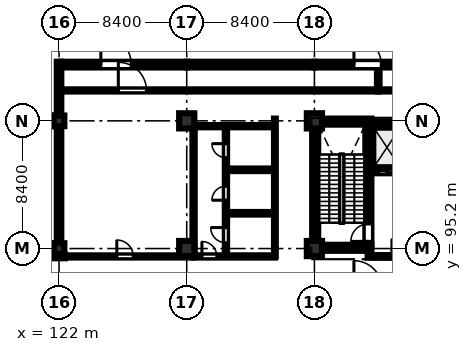
"""IFC4 building model, lengths in metres.
Left out: names, types, materials, properties, quantities, classifications, styles, units other than length and angle.
Written with IfcOpenShell. Run it as: python <this file> out.ifc"""

import sys

from ifc_helpers import new_model, si_unit, direction, frame, frame_2d, origin, origin_2d, place, context, subcontext, project, spatial, rectangle, extrude, element, fill, save


model = new_model("IFC4")
c1 = context("Model", 3, precision=1e-05, world=origin(), true_north=direction((0.0, 1.0)))
c2 = subcontext(c1, "Body", "Model", "MODEL_VIEW")
j1 = project(units=[si_unit("LENGTHUNIT", "METRE"), si_unit("PLANEANGLEUNIT", "RADIAN")], contexts=[c1])
p1 = place(None, origin())
s1 = spatial("IfcSite", under=j1, at=p1, CompositionType="ELEMENT")
p2 = place(p1, origin())
s2 = spatial("IfcBuilding", under=s1, at=p2, CompositionType="ELEMENT")
p3 = place(p2, origin())
s3 = spatial("IfcBuildingStorey", under=s2, at=p3, CompositionType="ELEMENT", Elevation=0.0)
for number, where, z_axis, x_axis in (
    (1, (122.0, 95.2, 0.0), (0.0, 0.0, 1.0), (1.0, 0.0, 0.0)),
    (2, (122.0, 103.6, 0.0), (0.0, 0.0, 1.0), (1.0, 0.0, 0.0)),
):
    element("IfcColumn", number, at=place(p3, frame(where, z_axis=z_axis, x_axis=x_axis)), inside=s3, PredefinedType="COLUMN", context=c2, shape_type="SweptSolid", body=[
        extrude(rectangle(XDim=0.7, YDim=0.7, at=origin_2d()), origin(), (0.0, 0.0, 1.0), 5.18),
    ])
for number, where, z_axis, x_axis in (
    (3, (130.4, 95.2, 0.0), (0.0, 0.0, 1.0), (1.0, 0.0, 0.0)),
    (4, (130.4, 103.6, 0.0), (0.0, 0.0, 1.0), (1.0, 0.0, 0.0)),
    (5, (138.8, 95.2, 0.0), (0.0, 0.0, 1.0), (1.0, 0.0, 0.0)),
    (6, (138.8, 103.6, 0.0), (0.0, 0.0, 1.0), (1.0, 0.0, 0.0)),
):
    element("IfcColumn", number, at=place(p3, frame(where, z_axis=z_axis, x_axis=x_axis)), inside=s3, PredefinedType="COLUMN", context=c2, shape_type="SweptSolid", body=[
        extrude(rectangle(XDim=1.0, YDim=1.0, at=origin_2d()), origin(), (0.0, 0.0, 1.0), 5.18),
    ])
for number, where, z_axis, x_axis in (
    (7, (138.65, 95.25, 0.0), (0.0, 0.0, 1.0), (1.0, 0.0, 0.0)),
    (8, (138.65, 103.55, 0.0), (0.0, 0.0, 1.0), (1.0, 0.0, 0.0)),
):
    element("IfcWall", number, at=place(p3, frame(where, z_axis=z_axis, x_axis=x_axis)), inside=s3, PredefinedType="SHEAR", context=c2, shape_type="SweptSolid", body=[
        extrude(rectangle(XDim=3.9, YDim=0.4, at=frame_2d((1.95, 0.0))), origin(), (0.0, 0.0, 1.0), 5.18),
    ])
p4 = place(p3, frame((138.85, 95.45, 0.0), z_axis=(0.0, 0.0, 1.0), x_axis=(0.0, 1.0, 0.0)))
e9 = element("IfcWall", 9, at=p4, inside=s3, PredefinedType="SHEAR", context=c2, shape_type="SweptSolid", body=[
    extrude(rectangle(XDim=7.9, YDim=0.4, at=frame_2d((3.95, 0.0))), origin(), (0.0, 0.0, 1.0), 5.18),
])
p5 = place(p3, frame((142.35, 95.45, 0.0), z_axis=(0.0, 0.0, 1.0), x_axis=(0.0, 1.0, 0.0)))
e10 = element("IfcWall", 10, at=p5, inside=s3, PredefinedType="SHEAR", context=c2, shape_type="SweptSolid", body=[
    extrude(rectangle(XDim=7.9, YDim=0.4, at=frame_2d((3.95, 0.0))), origin(), (0.0, 0.0, 1.0), 5.18),
])
p6 = place(p5, frame((0.22, 0.0, 0.0)))
e11 = element("IfcOpeningElement", 11, at=p6, cuts=e10, PredefinedType="OPENING", context=c2, shape_type="SweptSolid", body=[
    extrude(rectangle(XDim=1.15, YDim=2.15, at=frame_2d((0.575, 1.075))), frame((0.0, 0.21, 0.0), z_axis=(0.0, -1.0, 0.0), x_axis=(1.0, 0.0, 0.0)), (0.0, 0.0, 1.0), 0.42),
])
p7 = place(p3, frame((142.55, 100.275, 0.0), z_axis=(0.0, 0.0, 1.0), x_axis=(1.0, 0.0, 0.0)))
e12 = element("IfcWall", 12, at=p7, inside=s3, PredefinedType="SHEAR", context=c2, shape_type="SweptSolid", body=[
    extrude(rectangle(XDim=2.05, YDim=0.25, at=frame_2d((1.025, 0.0))), origin(), (0.0, 0.0, 1.0), 5.18),
])
p8 = place(p7, frame((0.475, 0.0, 0.0)))
e13 = element("IfcOpeningElement", 13, at=p8, cuts=e12, PredefinedType="OPENING", context=c2, shape_type="SweptSolid", body=[
    extrude(rectangle(XDim=1.1, YDim=2.15, at=frame_2d((0.55, 1.075))), frame((0.0, 0.135, 0.0), z_axis=(0.0, -1.0, 0.0), x_axis=(1.0, 0.0, 0.0)), (0.0, 0.0, 1.0), 0.27),
])
p9 = place(p3, frame((142.55, 103.425, 0.0), z_axis=(0.0, 0.0, 1.0), x_axis=(1.0, 0.0, 0.0)))
e14 = element("IfcWall", 14, at=p9, inside=s3, PredefinedType="SHEAR", context=c2, shape_type="SweptSolid", body=[
    extrude(rectangle(XDim=2.05, YDim=0.25, at=frame_2d((1.025, 0.0))), origin(), (0.0, 0.0, 1.0), 5.18),
])
p10 = place(p3, frame((122.15, 107.3, 0.0), z_axis=(0.0, 0.0, 1.0), x_axis=(1.0, 0.0, 0.0)))
e15 = element("IfcWall", 15, at=p10, inside=s3, PredefinedType="SOLIDWALL", context=c2, shape_type="SweptSolid", body=[
    extrude(rectangle(XDim=8.25, YDim=0.38, at=frame_2d((4.125, 0.0))), origin(), (0.0, 0.0, 1.0), 5.18),
])
p11 = place(p10, frame((2.6, 0.0, 0.0)))
e16 = element("IfcOpeningElement", 16, at=p11, cuts=e15, PredefinedType="OPENING", context=c2, shape_type="SweptSolid", body=[
    extrude(rectangle(XDim=2.0, YDim=2.4, at=frame_2d((1.0, 1.2))), frame((0.0, 0.2, 0.0), z_axis=(0.0, -1.0, 0.0), x_axis=(1.0, 0.0, 0.0)), (0.0, 0.0, 1.0), 0.4),
])
p12 = place(p3, frame((130.4, 107.3, 0.0), z_axis=(0.0, 0.0, 1.0), x_axis=(1.0, 0.0, 0.0)))
e17 = element("IfcWall", 17, at=p12, inside=s3, PredefinedType="SOLIDWALL", context=c2, shape_type="SweptSolid", body=[
    extrude(rectangle(XDim=8.4, YDim=0.38, at=frame_2d((4.2, 0.0))), origin(), (0.0, 0.0, 1.0), 5.18),
])
p13 = place(p12, frame((2.4, 0.0, 0.85)))
e18 = element("IfcOpeningElement", 18, at=p13, cuts=e17, PredefinedType="OPENING", context=c2, shape_type="SweptSolid", body=[
    extrude(rectangle(XDim=2.6, YDim=2.4, at=frame_2d((1.3, 1.2))), frame((0.0, 0.2, 0.0), z_axis=(0.0, -1.0, 0.0), x_axis=(1.0, 0.0, 0.0)), (0.0, 0.0, 1.0), 0.4),
])
p14 = place(p3, frame((138.8, 107.3, 0.0), z_axis=(0.0, 0.0, 1.0), x_axis=(1.0, 0.0, 0.0)))
e19 = element("IfcWall", 19, at=p14, inside=s3, PredefinedType="SOLIDWALL", context=c2, shape_type="SweptSolid", body=[
    extrude(rectangle(XDim=8.4, YDim=0.38, at=frame_2d((4.2, 0.0))), origin(), (0.0, 0.0, 1.0), 5.18),
])
p15 = place(p14, frame((2.6, 0.0, 0.0)))
e20 = element("IfcOpeningElement", 20, at=p15, cuts=e19, PredefinedType="OPENING", context=c2, shape_type="SweptSolid", body=[
    extrude(rectangle(XDim=1.8, YDim=2.3, at=frame_2d((0.9, 1.15))), frame((0.0, 0.2, 0.0), z_axis=(0.0, -1.0, 0.0), x_axis=(1.0, 0.0, 0.0)), (0.0, 0.0, 1.0), 0.4),
])
p16 = place(p3, frame((121.03, 94.68, 0.0), z_axis=(0.0, 0.0, 1.0), x_axis=(1.0, 0.0, 0.0)))
e21 = element("IfcWall", 21, at=p16, inside=s3, PredefinedType="STANDARD", context=c2, shape_type="SweptSolid", body=[
    extrude(rectangle(XDim=1.36, YDim=0.24, at=frame_2d((0.68, 0.0))), origin(), (0.0, 0.0, 1.0), 5.18),
])
p17 = place(p3, frame((122.0, 95.55, 0.0), z_axis=(0.0, 0.0, 1.0), x_axis=(0.0, 1.0, 0.0)))
e22 = element("IfcWall", 22, at=p17, inside=s3, PredefinedType="STANDARD", context=c2, shape_type="SweptSolid", body=[
    extrude(rectangle(XDim=7.7, YDim=0.3, at=frame_2d((3.85, 0.0))), origin(), (0.0, 0.0, 1.0), 4.43),
])
p18 = place(p3, frame((122.0, 103.95, 0.0), z_axis=(0.0, 0.0, 1.0), x_axis=(0.0, 1.0, 0.0)))
e23 = element("IfcWall", 23, at=p18, inside=s3, PredefinedType="STANDARD", context=c2, shape_type="SweptSolid", body=[
    extrude(rectangle(XDim=3.54, YDim=0.3, at=frame_2d((1.77, 0.0))), origin(), (0.0, 0.0, 1.0), 4.43),
])
p19 = place(p3, frame((142.3, 94.68, 0.0), z_axis=(0.0, 0.0, 1.0), x_axis=(1.0, 0.0, 0.0)))
e24 = element("IfcWall", 24, at=p19, inside=s3, PredefinedType="STANDARD", context=c2, shape_type="SweptSolid", body=[
    extrude(rectangle(XDim=4.8, YDim=0.18, at=frame_2d((2.4, 0.0))), origin(), (0.0, 0.0, 1.0), 5.18),
])
p20 = place(p19, frame((1.6, 0.0, 0.0)))
e25 = element("IfcOpeningElement", 25, at=p20, cuts=e24, PredefinedType="OPENING", context=c2, shape_type="SweptSolid", body=[
    extrude(rectangle(XDim=1.15, YDim=2.15, at=frame_2d((0.575, 1.075))), frame((0.0, 0.1, 0.0), z_axis=(0.0, -1.0, 0.0), x_axis=(1.0, 0.0, 0.0)), (0.0, 0.0, 1.0), 0.2),
])
p21 = place(p3, frame((130.85, 94.68, 0.0), z_axis=(0.0, 0.0, 1.0), x_axis=(1.0, 0.0, 0.0)))
e26 = element("IfcWall", 26, at=p21, inside=s3, PredefinedType="PARTITIONING", context=c2, shape_type="SweptSolid", body=[
    extrude(rectangle(XDim=5.35, YDim=0.15, at=frame_2d((2.675, 0.0))), origin(), (0.0, 0.0, 1.0), 5.18),
])
p22 = place(p21, frame((0.55, 0.0, 0.0)))
e27 = element("IfcOpeningElement", 27, at=p22, cuts=e26, PredefinedType="OPENING", context=c2, shape_type="SweptSolid", body=[
    extrude(rectangle(XDim=0.98, YDim=2.12, at=frame_2d((0.49, 1.06))), frame((0.0, 0.085, 0.0), z_axis=(0.0, -1.0, 0.0), x_axis=(1.0, 0.0, 0.0)), (0.0, 0.0, 1.0), 0.17),
])
p23 = place(p3, frame((132.98, 94.68, 0.0), z_axis=(0.0, 0.0, 1.0), x_axis=(0.0, 1.0, 0.0)))
e28 = element("IfcWall", 28, at=p23, inside=s3, PredefinedType="PARTITIONING", context=c2, shape_type="SweptSolid", body=[
    extrude(rectangle(XDim=8.57, YDim=0.15, at=frame_2d((4.285, 0.0))), origin(), (0.0, 0.0, 1.0), 5.18),
])
p24 = place(p23, frame((0.9, 0.0, 0.0)))
e29 = element("IfcOpeningElement", 29, at=p24, cuts=e28, PredefinedType="OPENING", context=c2, shape_type="SweptSolid", body=[
    extrude(rectangle(XDim=1.0, YDim=2.12, at=frame_2d((0.5, 1.06))), frame((0.0, 0.085, 0.0), z_axis=(0.0, -1.0, 0.0), x_axis=(1.0, 0.0, 0.0)), (0.0, 0.0, 1.0), 0.17),
])
p25 = place(p23, frame((3.7, 0.0, 0.0)))
e30 = element("IfcOpeningElement", 30, at=p25, cuts=e28, PredefinedType="OPENING", context=c2, shape_type="SweptSolid", body=[
    extrude(rectangle(XDim=0.92, YDim=2.1, at=frame_2d((0.46, 1.05))), frame((0.0, 0.085, 0.0), z_axis=(0.0, -1.0, 0.0), x_axis=(1.0, 0.0, 0.0)), (0.0, 0.0, 1.0), 0.17),
])
p26 = place(p23, frame((6.5, 0.0, 0.0)))
e31 = element("IfcOpeningElement", 31, at=p26, cuts=e28, PredefinedType="OPENING", context=c2, shape_type="SweptSolid", body=[
    extrude(rectangle(XDim=0.92, YDim=2.1, at=frame_2d((0.46, 1.05))), frame((0.0, 0.085, 0.0), z_axis=(0.0, -1.0, 0.0), x_axis=(1.0, 0.0, 0.0)), (0.0, 0.0, 1.0), 0.17),
])
for number, where, z_axis, x_axis in (
    (32, (132.98, 97.52, 0.0), (0.0, 0.0, 1.0), (1.0, 0.0, 0.0)),
    (33, (132.98, 100.38, 0.0), (0.0, 0.0, 1.0), (1.0, 0.0, 0.0)),
):
    element("IfcWall", number, at=place(p3, frame(where, z_axis=z_axis, x_axis=x_axis)), inside=s3, PredefinedType="PARTITIONING", context=c2, shape_type="SweptSolid", body=[
        extrude(rectangle(XDim=3.22, YDim=0.172, at=frame_2d((1.61, 0.0))), origin(), (0.0, 0.0, 1.0), 5.18),
    ])
p27 = place(p3, frame((130.85, 103.25, 0.0), z_axis=(0.0, 0.0, 1.0), x_axis=(1.0, 0.0, 0.0)))
e34 = element("IfcWall", 34, at=p27, inside=s3, PredefinedType="PARTITIONING", context=c2, shape_type="SweptSolid", body=[
    extrude(rectangle(XDim=5.35, YDim=0.15, at=frame_2d((2.675, 0.0))), origin(), (0.0, 0.0, 1.0), 5.18),
])
p28 = place(p3, frame((130.85, 94.68, 0.0), z_axis=(0.0, 0.0, 1.0), x_axis=(0.0, 1.0, 0.0)))
e35 = element("IfcWall", 35, at=p28, inside=s3, PredefinedType="PARTITIONING", context=c2, shape_type="SweptSolid", body=[
    extrude(rectangle(XDim=8.57, YDim=0.15, at=frame_2d((4.285, 0.0))), origin(), (0.0, 0.0, 1.0), 5.18),
])
p29 = place(p3, frame((136.2, 94.68, 0.0), z_axis=(0.0, 0.0, 1.0), x_axis=(0.0, 1.0, 0.0)))
e36 = element("IfcWall", 36, at=p29, inside=s3, PredefinedType="PARTITIONING", context=c2, shape_type="SweptSolid", body=[
    extrude(rectangle(XDim=9.07, YDim=0.12, at=frame_2d((4.535, 0.0))), origin(), (0.0, 0.0, 1.0), 5.18),
])
p30 = place(p3, frame((122.4, 94.68, 0.0), z_axis=(0.0, 0.0, 1.0), x_axis=(1.0, 0.0, 0.0)))
e37 = element("IfcWall", 37, at=p30, inside=s3, PredefinedType="PARTITIONING", context=c2, shape_type="SweptSolid", body=[
    extrude(rectangle(XDim=8.4, YDim=0.145, at=frame_2d((4.2, 0.0))), origin(), (0.0, 0.0, 1.0), 5.18),
])
p31 = place(p30, frame((3.4, 0.0, 0.0)))
e38 = element("IfcOpeningElement", 38, at=p31, cuts=e37, PredefinedType="OPENING", context=c2, shape_type="SweptSolid", body=[
    extrude(rectangle(XDim=1.08, YDim=2.15, at=frame_2d((0.54, 1.075))), frame((0.0, 0.083, 0.0), z_axis=(0.0, -1.0, 0.0), x_axis=(1.0, 0.0, 0.0)), (0.0, 0.0, 1.0), 0.165),
])
p32 = place(p3, frame((122.15, 105.6, 0.0), z_axis=(0.0, 0.0, 1.0), x_axis=(1.0, 0.0, 0.0)))
e39 = element("IfcWall", 39, at=p32, inside=s3, PredefinedType="PARTITIONING", context=c2, shape_type="SweptSolid", body=[
    extrude(rectangle(XDim=20.85, YDim=0.145, at=frame_2d((10.425, 0.0))), origin(), (0.0, 0.0, 1.0), 5.18),
])
p33 = place(p32, frame((3.75, 0.0, 0.0)))
e40 = element("IfcOpeningElement", 40, at=p33, cuts=e39, PredefinedType="OPENING", context=c2, shape_type="SweptSolid", body=[
    extrude(rectangle(XDim=1.85, YDim=2.25, at=frame_2d((0.925, 1.125))), frame((0.0, 0.083, 0.0), z_axis=(0.0, -1.0, 0.0), x_axis=(1.0, 0.0, 0.0)), (0.0, 0.0, 1.0), 0.165),
])
p34 = place(p3, frame((143.0, 105.6, 0.0), z_axis=(0.0, 0.0, 1.0), x_axis=(1.0, 0.0, 0.0)))
e41 = element("IfcWall", 41, at=p34, inside=s3, PredefinedType="PARTITIONING", context=c2, shape_type="SweptSolid", body=[
    extrude(rectangle(XDim=16.12, YDim=0.145, at=frame_2d((8.06, 0.0))), origin(), (0.0, 0.0, 1.0), 5.18),
])
p35 = place(p34, frame((6.8, 0.0, 0.0)))
e42 = element("IfcOpeningElement", 42, at=p35, cuts=e41, PredefinedType="OPENING", context=c2, shape_type="SweptSolid", body=[
    extrude(rectangle(XDim=1.08, YDim=2.15, at=frame_2d((0.54, 1.075))), frame((0.0, 0.083, 0.0), z_axis=(0.0, -1.0, 0.0), x_axis=(1.0, 0.0, 0.0)), (0.0, 0.0, 1.0), 0.165),
])
p36 = place(p3, frame((143.0, 105.6, 0.0), z_axis=(0.0, 0.0, 1.0), x_axis=(0.0, 1.0, 0.0)))
e43 = element("IfcWall", 43, at=p36, inside=s3, PredefinedType="PARTITIONING", context=c2, shape_type="SweptSolid", body=[
    extrude(rectangle(XDim=1.52, YDim=0.172, at=frame_2d((0.76, 0.0))), origin(), (0.0, 0.0, 1.0), 4.78),
])
p37 = place(p11, origin())
e44 = element("IfcDoor", 44, at=p37, inside=s3, OperationType="SINGLE_SWING_LEFT", PredefinedType="DOOR", context=c2, shape_type="SweptSolid", body=[
    extrude(rectangle(XDim=2.0, YDim=2.4, at=frame_2d((1.0, 1.2))), frame((0.0, 0.025, 0.0), z_axis=(0.0, -1.0, 0.0), x_axis=(1.0, 0.0, 0.0)), (0.0, 0.0, 1.0), 0.05),
])
fill(e16, e44)
p38 = place(p13, origin())
e45 = element("IfcWindow", 45, at=p38, inside=s3, PartitioningType="TRIPLE_PANEL_VERTICAL", PredefinedType="WINDOW", context=c2, shape_type="SweptSolid", body=[
    extrude(rectangle(XDim=2.6, YDim=2.4, at=frame_2d((1.3, 1.2))), frame((0.0, 0.03, 0.0), z_axis=(0.0, -1.0, 0.0), x_axis=(1.0, 0.0, 0.0)), (0.0, 0.0, 1.0), 0.06),
])
fill(e18, e45)
p39 = place(p15, origin())
e46 = element("IfcDoor", 46, at=p39, inside=s3, OperationType="SINGLE_SWING_LEFT", PredefinedType="DOOR", context=c2, shape_type="SweptSolid", body=[
    extrude(rectangle(XDim=1.8, YDim=2.3, at=frame_2d((0.9, 1.15))), frame((0.0, 0.025, 0.0), z_axis=(0.0, -1.0, 0.0), x_axis=(1.0, 0.0, 0.0)), (0.0, 0.0, 1.0), 0.05),
])
fill(e20, e46)
p40 = place(p20, origin())
e47 = element("IfcDoor", 47, at=p40, inside=s3, OperationType="SINGLE_SWING_LEFT", PredefinedType="DOOR", context=c2, shape_type="SweptSolid", body=[
    extrude(rectangle(XDim=1.15, YDim=2.15, at=frame_2d((0.575, 1.075))), frame((0.0, 0.025, 0.0), z_axis=(0.0, -1.0, 0.0), x_axis=(1.0, 0.0, 0.0)), (0.0, 0.0, 1.0), 0.05),
])
fill(e25, e47)
p41 = place(p22, origin())
e48 = element("IfcDoor", 48, at=p41, inside=s3, OperationType="SINGLE_SWING_LEFT", PredefinedType="DOOR", context=c2, shape_type="SweptSolid", body=[
    extrude(rectangle(XDim=0.98, YDim=2.12, at=frame_2d((0.49, 1.06))), frame((0.0, 0.025, 0.0), z_axis=(0.0, -1.0, 0.0), x_axis=(1.0, 0.0, 0.0)), (0.0, 0.0, 1.0), 0.05),
])
fill(e27, e48)
p42 = place(p24, origin())
e49 = element("IfcDoor", 49, at=p42, inside=s3, OperationType="SINGLE_SWING_RIGHT", PredefinedType="DOOR", context=c2, shape_type="SweptSolid", body=[
    extrude(rectangle(XDim=1.0, YDim=2.12, at=frame_2d((0.5, 1.06))), frame((0.0, 0.025, 0.0), z_axis=(0.0, -1.0, 0.0), x_axis=(1.0, 0.0, 0.0)), (0.0, 0.0, 1.0), 0.05),
])
fill(e29, e49)
p43 = place(p25, origin())
e50 = element("IfcDoor", 50, at=p43, inside=s3, OperationType="SINGLE_SWING_LEFT", PredefinedType="DOOR", context=c2, shape_type="SweptSolid", body=[
    extrude(rectangle(XDim=0.92, YDim=2.1, at=frame_2d((0.46, 1.05))), frame((0.0, 0.025, 0.0), z_axis=(0.0, -1.0, 0.0), x_axis=(1.0, 0.0, 0.0)), (0.0, 0.0, 1.0), 0.05),
])
fill(e30, e50)
p44 = place(p26, origin())
e51 = element("IfcDoor", 51, at=p44, inside=s3, OperationType="SINGLE_SWING_RIGHT", PredefinedType="DOOR", context=c2, shape_type="SweptSolid", body=[
    extrude(rectangle(XDim=0.92, YDim=2.1, at=frame_2d((0.46, 1.05))), frame((0.0, 0.025, 0.0), z_axis=(0.0, -1.0, 0.0), x_axis=(1.0, 0.0, 0.0)), (0.0, 0.0, 1.0), 0.05),
])
fill(e31, e51)
p45 = place(p31, origin())
e52 = element("IfcDoor", 52, at=p45, inside=s3, OperationType="SINGLE_SWING_LEFT", PredefinedType="DOOR", context=c2, shape_type="SweptSolid", body=[
    extrude(rectangle(XDim=1.08, YDim=2.15, at=frame_2d((0.54, 1.075))), frame((0.0, 0.025, 0.0), z_axis=(0.0, -1.0, 0.0), x_axis=(1.0, 0.0, 0.0)), (0.0, 0.0, 1.0), 0.05),
])
fill(e38, e52)
p46 = place(p33, origin())
e53 = element("IfcDoor", 53, at=p46, inside=s3, OperationType="SINGLE_SWING_LEFT", PredefinedType="DOOR", context=c2, shape_type="SweptSolid", body=[
    extrude(rectangle(XDim=1.85, YDim=2.25, at=frame_2d((0.925, 1.125))), frame((0.0, 0.025, 0.0), z_axis=(0.0, -1.0, 0.0), x_axis=(1.0, 0.0, 0.0)), (0.0, 0.0, 1.0), 0.05),
])
fill(e40, e53)
p47 = place(p6, origin())
e54 = element("IfcDoor", 54, at=p47, inside=s3, OperationType="SINGLE_SWING_LEFT", PredefinedType="DOOR", context=c2, shape_type="SweptSolid", body=[
    extrude(rectangle(XDim=1.15, YDim=2.15, at=frame_2d((0.575, 1.075))), frame((0.0, 0.025, 0.0), z_axis=(0.0, -1.0, 0.0), x_axis=(1.0, 0.0, 0.0)), (0.0, 0.0, 1.0), 0.05),
])
fill(e11, e54)
p48 = place(p8, origin())
e55 = element("IfcDoor", 55, at=p48, inside=s3, OperationType="SLIDING_TO_LEFT", PredefinedType="DOOR", context=c2, shape_type="SweptSolid", body=[
    extrude(rectangle(XDim=1.1, YDim=2.15, at=frame_2d((0.55, 1.075))), frame((0.0, 0.025, 0.0), z_axis=(0.0, -1.0, 0.0), x_axis=(1.0, 0.0, 0.0)), (0.0, 0.0, 1.0), 0.05),
])
fill(e13, e55)
save(model, sys.argv[1])
